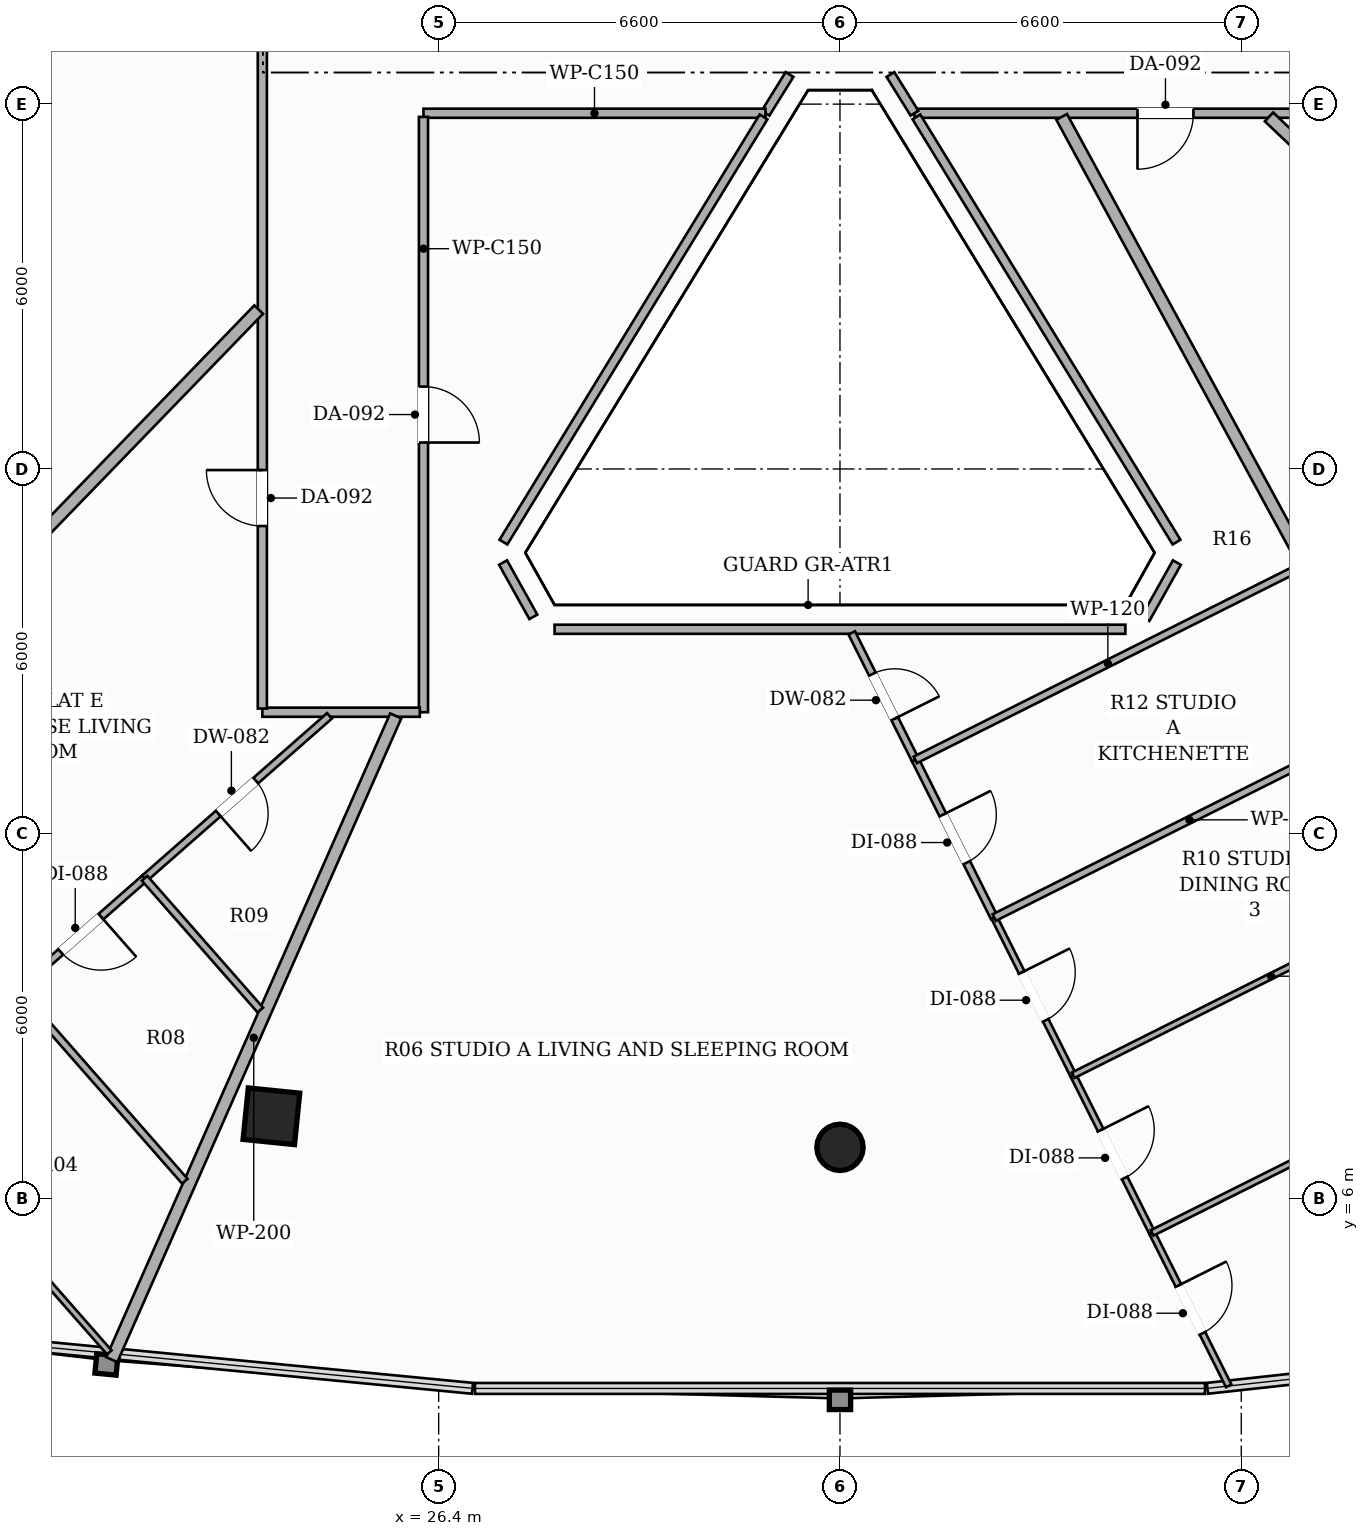
"""IFC4 building model, lengths in metres.
Left out: names, types, materials, properties, quantities, classifications, styles, units other than length and angle.
Written with IfcOpenShell. Run it as: python <this file> out.ifc"""

import sys

from ifc_helpers import new_model, si_unit, direction, frame, frame_2d, origin, origin_2d, place, context, subcontext, project, spatial, rectangle, hollow_rectangle, hollow_circle, extrude, element, fill, save


model = new_model("IFC4")
c1 = context("Model", 3, precision=1e-05, world=origin(), true_north=direction((0.0, 1.0)))
c2 = subcontext(c1, "Body", "Model", "MODEL_VIEW")
j1 = project(units=[si_unit("LENGTHUNIT", "METRE"), si_unit("PLANEANGLEUNIT", "RADIAN")], contexts=[c1])
p1 = place(None, origin())
s1 = spatial("IfcSite", under=j1, at=p1, CompositionType="ELEMENT")
p2 = place(p1, origin())
s2 = spatial("IfcBuilding", under=s1, at=p2, CompositionType="ELEMENT")
p3 = place(p2, frame((0.0, 0.0, 106.7)))
s3 = spatial("IfcBuildingStorey", under=s2, at=p3, CompositionType="ELEMENT", Elevation=106.7)
p4 = place(p3, frame((23.649, 7.355, 0.0), z_axis=(0.0, 0.0, 1.0), x_axis=(-0.994880708829, 0.101056297183, 0.0)))
e1 = element("IfcColumn", 1, at=p4, inside=s3, PredefinedType="COLUMN", context=c2, shape_type="SweptSolid", body=[
    extrude(hollow_rectangle(XDim=0.85, YDim=0.85, WallThickness=0.028, at=origin_2d()), origin(), (0.0, 0.0, 1.0), 3.3),
])
p5 = place(p3, frame((33.0, 6.844, 0.0), z_axis=(0.0, 0.0, 1.0), x_axis=(1.0, 0.0, 0.0)))
e2 = element("IfcColumn", 2, at=p5, inside=s3, PredefinedType="COLUMN", context=c2, shape_type="SweptSolid", body=[
    extrude(hollow_circle(Radius=0.381, WallThickness=0.022, at=origin_2d()), origin(), (0.0, 0.0, 1.0), 3.3),
])
p6 = place(p3, frame((20.095, 34.718, 0.0), z_axis=(0.0, 0.0, 1.0), x_axis=(-0.514362369366, -0.857572943242, 0.0)))
e3 = element("IfcWall", 3, at=p6, inside=s3, PredefinedType="SOLIDWALL", context=c2, shape_type="SweptSolid", body=[
    extrude(rectangle(XDim=11.844, YDim=0.24, at=frame_2d((5.922, 0.0))), origin(), (0.0, 0.0, 1.0), 2.624),
])
p7 = place(p6, frame((9.346, 0.0, 0.0)))
e4 = element("IfcOpeningElement", 4, at=p7, cuts=e3, PredefinedType="OPENING", context=c2, shape_type="SweptSolid", body=[
    extrude(rectangle(XDim=1.8, YDim=2.2, at=frame_2d((0.9, 1.1))), frame((0.0, 0.13, 0.0), z_axis=(0.0, -1.0, 0.0), x_axis=(1.0, 0.0, 0.0)), (0.0, 0.0, 1.0), 0.26),
])
p8 = place(p3, frame((32.17, 24.487, 0.0), z_axis=(0.0, 0.0, 1.0), x_axis=(-0.527038486816, -0.849841416627, 0.0)))
e5 = element("IfcWall", 5, at=p8, inside=s3, PredefinedType="PARTITIONING", context=c2, shape_type="SweptSolid", body=[
    extrude(rectangle(XDim=0.75, YDim=0.15, at=frame_2d((0.375, 0.0))), origin(), (0.0, 0.0, 1.0), 3.06),
])
p9 = place(p3, frame((31.775, 23.85, 0.0), z_axis=(0.0, 0.0, 1.0), x_axis=(-1.0, 0.0, 0.0)))
e6 = element("IfcWall", 6, at=p9, inside=s3, PredefinedType="PARTITIONING", context=c2, shape_type="SweptSolid", body=[
    extrude(rectangle(XDim=5.625, YDim=0.15, at=frame_2d((2.812, 0.0))), origin(), (0.0, 0.0, 1.0), 2.721),
])
p10 = place(p3, frame((26.15, 23.79, 0.0), z_axis=(0.0, 0.0, 1.0), x_axis=(0.0, -1.0, 0.0)))
e7 = element("IfcWall", 7, at=p10, inside=s3, PredefinedType="PARTITIONING", context=c2, shape_type="SweptSolid", body=[
    extrude(rectangle(XDim=9.79, YDim=0.15, at=frame_2d((4.895, 0.0))), origin(), (0.0, 0.0, 1.0), 2.721),
])
p11 = place(p10, frame((4.435, 0.0, 0.0)))
e8 = element("IfcOpeningElement", 8, at=p11, cuts=e7, PredefinedType="OPENING", context=c2, shape_type="SweptSolid", body=[
    extrude(rectangle(XDim=0.92, YDim=2.15, at=frame_2d((0.46, 1.075))), frame((0.0, 0.085, 0.0), z_axis=(0.0, -1.0, 0.0), x_axis=(1.0, 0.0, 0.0)), (0.0, 0.0, 1.0), 0.17),
])
p12 = place(p3, frame((26.09, 14.0, 0.0), z_axis=(0.0, 0.0, 1.0), x_axis=(-1.0, 0.0, 0.0)))
e9 = element("IfcWall", 9, at=p12, inside=s3, PredefinedType="PARTITIONING", context=c2, shape_type="SweptSolid", body=[
    extrude(rectangle(XDim=2.59, YDim=0.15, at=frame_2d((1.295, 0.0))), origin(), (0.0, 0.0, 1.0), 2.721),
])
p13 = place(p3, frame((23.5, 14.06, 0.0), z_axis=(0.0, 0.0, 1.0), x_axis=(0.0, 1.0, 0.0)))
e10 = element("IfcWall", 10, at=p13, inside=s3, PredefinedType="PARTITIONING", context=c2, shape_type="SweptSolid", body=[
    extrude(rectangle(XDim=22.84, YDim=0.15, at=frame_2d((11.42, 0.0))), origin(), (0.0, 0.0, 1.0), 2.413),
])
p14 = place(p13, frame((13.373, 0.0, 0.0)))
e11 = element("IfcOpeningElement", 11, at=p14, cuts=e10, PredefinedType="OPENING", context=c2, shape_type="SweptSolid", body=[
    extrude(rectangle(XDim=0.88, YDim=2.1, at=frame_2d((0.44, 1.05))), frame((0.0, 0.085, 0.0), z_axis=(0.0, -1.0, 0.0), x_axis=(1.0, 0.0, 0.0)), (0.0, 0.0, 1.0), 0.17),
])
p15 = place(p13, frame((3.002, 0.0, 0.0)))
e12 = element("IfcOpeningElement", 12, at=p15, cuts=e10, PredefinedType="OPENING", context=c2, shape_type="SweptSolid", body=[
    extrude(rectangle(XDim=0.92, YDim=2.15, at=frame_2d((0.46, 1.075))), frame((0.0, 0.085, 0.0), z_axis=(0.0, -1.0, 0.0), x_axis=(1.0, 0.0, 0.0)), (0.0, 0.0, 1.0), 0.17),
])
p16 = place(p3, frame((42.29, 23.85, 0.0), z_axis=(0.0, 0.0, 1.0), x_axis=(-1.0, 0.0, 0.0)))
e13 = element("IfcWall", 13, at=p16, inside=s3, PredefinedType="PARTITIONING", context=c2, shape_type="SweptSolid", body=[
    extrude(rectangle(XDim=8.065, YDim=0.15, at=frame_2d((4.032, 0.0))), origin(), (0.0, 0.0, 1.0), 2.492),
])
p17 = place(p16, frame((3.477, 0.0, 0.0)))
e14 = element("IfcOpeningElement", 14, at=p17, cuts=e13, PredefinedType="OPENING", context=c2, shape_type="SweptSolid", body=[
    extrude(rectangle(XDim=0.92, YDim=2.15, at=frame_2d((0.46, 1.075))), frame((0.0, 0.085, 0.0), z_axis=(0.0, -1.0, 0.0), x_axis=(1.0, 0.0, 0.0)), (0.0, 0.0, 1.0), 0.17),
])
p18 = place(p16, frame((0.14, 0.0, 0.0)))
e15 = element("IfcOpeningElement", 15, at=p18, cuts=e13, PredefinedType="OPENING", context=c2, shape_type="SweptSolid", body=[
    extrude(rectangle(XDim=0.88, YDim=2.1, at=frame_2d((0.44, 1.05))), frame((0.0, 0.085, 0.0), z_axis=(0.0, -1.0, 0.0), x_axis=(1.0, 0.0, 0.0)), (0.0, 0.0, 1.0), 0.17),
])
p19 = place(p3, frame((34.225, 23.851, 0.0), z_axis=(0.0, 0.0, 1.0), x_axis=(-0.527622593928, 0.849478898135, 0.0)))
e16 = element("IfcWall", 16, at=p19, inside=s3, PredefinedType="PARTITIONING", context=c2, shape_type="SweptSolid", body=[
    extrude(rectangle(XDim=0.749, YDim=0.15, at=frame_2d((0.375, 0.0))), origin(), (0.0, 0.0, 1.0), 3.06),
])
p20 = place(p3, frame((34.257, 23.79, 0.0), z_axis=(0.0, 0.0, 1.0), x_axis=(0.521839061235, -0.853043957935, 0.0)))
e17 = element("IfcWall", 17, at=p20, inside=s3, PredefinedType="PARTITIONING", context=c2, shape_type="SweptSolid", body=[
    extrude(rectangle(XDim=8.198, YDim=0.15, at=frame_2d((4.099, 0.0))), origin(), (0.0, 0.0, 1.0), 2.721),
])
p21 = place(p3, frame((38.541, 16.461, 0.0), z_axis=(0.0, 0.0, 1.0), x_axis=(-0.488631416095, -0.872490308946, 0.0)))
e18 = element("IfcWall", 18, at=p21, inside=s3, PredefinedType="PARTITIONING", context=c2, shape_type="SweptSolid", body=[
    extrude(rectangle(XDim=1.06, YDim=0.15, at=frame_2d((0.53, 0.0))), origin(), (0.0, 0.0, 1.0), 3.06),
])
p22 = place(p3, frame((37.694, 15.364, 0.0), z_axis=(0.0, 0.0, 1.0), x_axis=(-1.0, 0.0, 0.0)))
e19 = element("IfcWall", 19, at=p22, inside=s3, PredefinedType="PARTITIONING", context=c2, shape_type="SweptSolid", body=[
    extrude(rectangle(XDim=9.388, YDim=0.15, at=frame_2d((4.694, 0.0))), origin(), (0.0, 0.0, 1.0), 2.721),
])
p23 = place(p3, frame((27.957, 15.568, 0.0), z_axis=(0.0, 0.0, 1.0), x_axis=(-0.487162890713, 0.873311123204, 0.0)))
e20 = element("IfcWall", 20, at=p23, inside=s3, PredefinedType="PARTITIONING", context=c2, shape_type="SweptSolid", body=[
    extrude(rectangle(XDim=1.022, YDim=0.15, at=frame_2d((0.511, 0.0))), origin(), (0.0, 0.0, 1.0), 3.06),
])
p24 = place(p3, frame((27.465, 16.797, 0.0), z_axis=(0.0, 0.0, 1.0), x_axis=(0.521839061235, 0.853043957935, 0.0)))
e21 = element("IfcWall", 21, at=p24, inside=s3, PredefinedType="PARTITIONING", context=c2, shape_type="SweptSolid", body=[
    extrude(rectangle(XDim=8.198, YDim=0.15, at=frame_2d((4.099, 0.0))), origin(), (0.0, 0.0, 1.0), 2.721),
])
p25 = place(p3, frame((36.646, 23.79, 0.0), z_axis=(0.0, 0.0, 1.0), x_axis=(0.477391569207, -0.878690667784, 0.0)))
e22 = element("IfcWall", 22, at=p25, inside=s3, PredefinedType="PARTITIONING", context=c2, shape_type="SweptSolid", body=[
    extrude(rectangle(XDim=22.918, YDim=0.2, at=frame_2d((11.459, 0.0))), origin(), (0.0, 0.0, 1.0), 2.413),
])
p26 = place(p3, frame((21.024, 3.353, 0.0), z_axis=(0.0, 0.0, 1.0), x_axis=(0.403601766718, 0.914934759369, 0.0)))
e23 = element("IfcWall", 23, at=p26, inside=s3, PredefinedType="PARTITIONING", context=c2, shape_type="SweptSolid", body=[
    extrude(rectangle(XDim=11.571, YDim=0.2, at=frame_2d((5.786, 0.0))), origin(), (0.0, 0.0, 1.0), 2.413),
])
p27 = place(p3, frame((23.44, 20.621, 0.0), z_axis=(0.0, 0.0, 1.0), x_axis=(-0.695405261367, -0.718617786075, 0.0)))
e24 = element("IfcWall", 24, at=p27, inside=s3, PredefinedType="PARTITIONING", context=c2, shape_type="SweptSolid", body=[
    extrude(rectangle(XDim=21.635, YDim=0.2, at=frame_2d((10.817, 0.0))), origin(), (0.0, 0.0, 1.0), 2.413),
])
p28 = place(p3, frame((40.056, 23.79, 0.0), z_axis=(0.0, 0.0, 1.0), x_axis=(0.724633427165, -0.68913452695, 0.0)))
e25 = element("IfcWall", 25, at=p28, inside=s3, PredefinedType="PARTITIONING", context=c2, shape_type="SweptSolid", body=[
    extrude(rectangle(XDim=25.921, YDim=0.2, at=frame_2d((12.96, 0.0))), origin(), (0.0, 0.0, 1.0), 2.413),
])
p29 = place(p3, frame((33.194, 15.304, 0.0), z_axis=(0.0, 0.0, 1.0), x_axis=(0.447548179666, -0.894259820677, 0.0)))
e26 = element("IfcWall", 26, at=p29, inside=s3, PredefinedType="PARTITIONING", context=c2, shape_type="SweptSolid", body=[
    extrude(rectangle(XDim=2.335, YDim=0.12, at=frame_2d((1.167, 0.0))), origin(), (0.0, 0.0, 1.0), 2.721),
])
p30 = place(p29, frame((0.757, 0.0, 0.0)))
e27 = element("IfcOpeningElement", 27, at=p30, cuts=e26, PredefinedType="OPENING", context=c2, shape_type="SweptSolid", body=[
    extrude(rectangle(XDim=0.82, YDim=2.1, at=frame_2d((0.41, 1.05))), frame((0.0, 0.07, 0.0), z_axis=(0.0, -1.0, 0.0), x_axis=(1.0, 0.0, 0.0)), (0.0, 0.0, 1.0), 0.14),
])
p31 = place(p3, frame((34.239, 13.216, 0.0), z_axis=(0.0, 0.0, 1.0), x_axis=(0.447651342751, -0.894208183441, 0.0)))
e28 = element("IfcWall", 28, at=p31, inside=s3, PredefinedType="PARTITIONING", context=c2, shape_type="SweptSolid", body=[
    extrude(rectangle(XDim=2.9, YDim=0.12, at=frame_2d((1.45, 0.0))), origin(), (0.0, 0.0, 1.0), 3.06),
])
p32 = place(p31, frame((1.01, 0.0, 0.0)))
e29 = element("IfcOpeningElement", 29, at=p32, cuts=e28, PredefinedType="OPENING", context=c2, shape_type="SweptSolid", body=[
    extrude(rectangle(XDim=0.88, YDim=2.1, at=frame_2d((0.44, 1.05))), frame((0.0, 0.07, 0.0), z_axis=(0.0, -1.0, 0.0), x_axis=(1.0, 0.0, 0.0)), (0.0, 0.0, 1.0), 0.14),
])
p33 = place(p3, frame((38.134, 5.437, 0.0), z_axis=(0.0, 0.0, 1.0), x_axis=(0.447768773835, -0.894149386388, 0.0)))
e30 = element("IfcWall", 30, at=p33, inside=s3, PredefinedType="PARTITIONING", context=c2, shape_type="SweptSolid", body=[
    extrude(rectangle(XDim=2.814, YDim=0.1, at=frame_2d((1.407, 0.0))), origin(), (0.0, 0.0, 1.0), 3.06),
])
p34 = place(p33, frame((0.967, 0.0, 0.0)))
e31 = element("IfcOpeningElement", 31, at=p34, cuts=e30, PredefinedType="OPENING", context=c2, shape_type="SweptSolid", body=[
    extrude(rectangle(XDim=0.88, YDim=2.1, at=frame_2d((0.44, 1.05))), frame((0.0, 0.06, 0.0), z_axis=(0.0, -1.0, 0.0), x_axis=(1.0, 0.0, 0.0)), (0.0, 0.0, 1.0), 0.12),
])
p35 = place(p3, frame((36.836, 8.03, 0.0), z_axis=(0.0, 0.0, 1.0), x_axis=(0.447651342751, -0.894208183441, 0.0)))
e32 = element("IfcWall", 32, at=p35, inside=s3, PredefinedType="PARTITIONING", context=c2, shape_type="SweptSolid", body=[
    extrude(rectangle(XDim=2.9, YDim=0.1, at=frame_2d((1.45, 0.0))), origin(), (0.0, 0.0, 1.0), 2.413),
])
p36 = place(p35, frame((1.01, 0.0, 0.0)))
e33 = element("IfcOpeningElement", 33, at=p36, cuts=e32, PredefinedType="OPENING", context=c2, shape_type="SweptSolid", body=[
    extrude(rectangle(XDim=0.88, YDim=2.1, at=frame_2d((0.44, 1.05))), frame((0.0, 0.06, 0.0), z_axis=(0.0, -1.0, 0.0), x_axis=(1.0, 0.0, 0.0)), (0.0, 0.0, 1.0), 0.12),
])
p37 = place(p3, frame((35.537, 10.623, 0.0), z_axis=(0.0, 0.0, 1.0), x_axis=(0.447853271476, -0.894107066983, 0.0)))
e34 = element("IfcWall", 34, at=p37, inside=s3, PredefinedType="PARTITIONING", context=c2, shape_type="SweptSolid", body=[
    extrude(rectangle(XDim=2.9, YDim=0.1, at=frame_2d((1.45, 0.0))), origin(), (0.0, 0.0, 1.0), 3.06),
])
p38 = place(p37, frame((1.01, 0.0, 0.0)))
e35 = element("IfcOpeningElement", 35, at=p38, cuts=e34, PredefinedType="OPENING", context=c2, shape_type="SweptSolid", body=[
    extrude(rectangle(XDim=0.88, YDim=2.1, at=frame_2d((0.44, 1.05))), frame((0.0, 0.06, 0.0), z_axis=(0.0, -1.0, 0.0), x_axis=(1.0, 0.0, 0.0)), (0.0, 0.0, 1.0), 0.12),
])
p39 = place(p3, frame((40.572, 16.387, 0.0), z_axis=(0.0, 0.0, 1.0), x_axis=(-0.894178861749, -0.447709909653, 0.0)))
e36 = element("IfcWall", 36, at=p39, inside=s3, PredefinedType="PARTITIONING", context=c2, shape_type="SweptSolid", body=[
    extrude(rectangle(XDim=7.083, YDim=0.12, at=frame_2d((3.541, 0.0))), origin(), (0.0, 0.0, 1.0), 2.721),
])
p40 = place(p3, frame((41.957, 13.837, 0.0), z_axis=(0.0, 0.0, 1.0), x_axis=(-0.894209449688, -0.447648813344, 0.0)))
e37 = element("IfcWall", 37, at=p40, inside=s3, PredefinedType="PARTITIONING", context=c2, shape_type="SweptSolid", body=[
    extrude(rectangle(XDim=7.179, YDim=0.12, at=frame_2d((3.59, 0.0))), origin(), (0.0, 0.0, 1.0), 2.721),
])
p41 = place(p3, frame((38.134, 5.437, 0.0), z_axis=(0.0, 0.0, 1.0), x_axis=(0.894182030014, 0.447703581849, 0.0)))
e38 = element("IfcWall", 38, at=p41, inside=s3, PredefinedType="PARTITIONING", context=c2, shape_type="SweptSolid", body=[
    extrude(rectangle(XDim=7.373, YDim=0.1, at=frame_2d((3.687, 0.0))), origin(), (0.0, 0.0, 1.0), 2.413),
])
p42 = place(p3, frame((36.836, 8.03, 0.0), z_axis=(0.0, 0.0, 1.0), x_axis=(0.894205618721, 0.447656465884, 0.0)))
e39 = element("IfcWall", 39, at=p42, inside=s3, PredefinedType="PARTITIONING", context=c2, shape_type="SweptSolid", body=[
    extrude(rectangle(XDim=7.276, YDim=0.1, at=frame_2d((3.638, 0.0))), origin(), (0.0, 0.0, 1.0), 2.721),
])
p43 = place(p3, frame((24.604, 13.94, 0.0), z_axis=(0.0, 0.0, 1.0), x_axis=(-0.751349767919, -0.659904179595, 0.0)))
e40 = element("IfcWall", 40, at=p43, inside=s3, PredefinedType="PARTITIONING", context=c2, shape_type="SweptSolid", body=[
    extrude(rectangle(XDim=4.047, YDim=0.12, at=frame_2d((2.024, 0.0))), origin(), (0.0, 0.0, 1.0), 2.721),
])
p44 = place(p43, frame((1.614, 0.0, 0.0)))
e41 = element("IfcOpeningElement", 41, at=p44, cuts=e40, PredefinedType="OPENING", context=c2, shape_type="SweptSolid", body=[
    extrude(rectangle(XDim=0.82, YDim=2.1, at=frame_2d((0.41, 1.05))), frame((0.0, 0.07, 0.0), z_axis=(0.0, -1.0, 0.0), x_axis=(1.0, 0.0, 0.0)), (0.0, 0.0, 1.0), 0.14),
])
p45 = place(p3, frame((21.563, 11.269, 0.0), z_axis=(0.0, 0.0, 1.0), x_axis=(-0.751138604229, -0.660144527537, 0.0)))
e42 = element("IfcWall", 42, at=p45, inside=s3, PredefinedType="PARTITIONING", context=c2, shape_type="SweptSolid", body=[
    extrude(rectangle(XDim=2.79, YDim=0.12, at=frame_2d((1.395, 0.0))), origin(), (0.0, 0.0, 1.0), 2.721),
])
p46 = place(p45, frame((0.955, 0.0, 0.0)))
e43 = element("IfcOpeningElement", 43, at=p46, cuts=e42, PredefinedType="OPENING", context=c2, shape_type="SweptSolid", body=[
    extrude(rectangle(XDim=0.88, YDim=2.1, at=frame_2d((0.44, 1.05))), frame((0.0, 0.07, 0.0), z_axis=(0.0, -1.0, 0.0), x_axis=(1.0, 0.0, 0.0)), (0.0, 0.0, 1.0), 0.14),
])
p47 = place(p3, frame((23.467, 9.102, 0.0), z_axis=(0.0, 0.0, 1.0), x_axis=(-0.660061062947, 0.751211949573, 0.0)))
e44 = element("IfcWall", 44, at=p47, inside=s3, PredefinedType="PARTITIONING", context=c2, shape_type="SweptSolid", body=[
    extrude(rectangle(XDim=2.885, YDim=0.12, at=frame_2d((1.442, 0.0))), origin(), (0.0, 0.0, 1.0), 2.721),
])
p48 = place(p3, frame((22.225, 6.287, 0.0), z_axis=(0.0, 0.0, 1.0), x_axis=(-0.659946783628, 0.751312347016, 0.0)))
e45 = element("IfcWall", 45, at=p48, inside=s3, PredefinedType="PARTITIONING", context=c2, shape_type="SweptSolid", body=[
    extrude(rectangle(XDim=4.179, YDim=0.12, at=frame_2d((2.09, 0.0))), origin(), (0.0, 0.0, 1.0), 2.413),
])
p49 = place(p3, frame((17.37, 7.586, 0.0), z_axis=(0.0, 0.0, 1.0), x_axis=(0.659851528992, -0.751396007234, 0.0)))
e46 = element("IfcWall", 46, at=p49, inside=s3, PredefinedType="PARTITIONING", context=c2, shape_type="SweptSolid", body=[
    extrude(rectangle(XDim=5.475, YDim=0.1, at=frame_2d((2.738, 0.0))), origin(), (0.0, 0.0, 1.0), 2.413),
])
p50 = place(p11, origin())
e47 = element("IfcDoor", 47, at=p50, inside=s3, OperationType="SINGLE_SWING_RIGHT", PredefinedType="DOOR", context=c2, shape_type="SweptSolid", body=[
    extrude(rectangle(XDim=0.92, YDim=2.15, at=frame_2d((0.46, 1.075))), frame((0.0, 0.025, 0.0), z_axis=(0.0, -1.0, 0.0), x_axis=(1.0, 0.0, 0.0)), (0.0, 0.0, 1.0), 0.05),
])
fill(e8, e47)
p51 = place(p30, origin())
e48 = element("IfcDoor", 48, at=p51, inside=s3, OperationType="SINGLE_SWING_RIGHT", PredefinedType="DOOR", context=c2, shape_type="SweptSolid", body=[
    extrude(rectangle(XDim=0.82, YDim=2.1, at=frame_2d((0.41, 1.05))), frame((0.0, 0.025, 0.0), z_axis=(0.0, -1.0, 0.0), x_axis=(1.0, 0.0, 0.0)), (0.0, 0.0, 1.0), 0.05),
])
fill(e27, e48)
p52 = place(p32, origin())
e49 = element("IfcDoor", 49, at=p52, inside=s3, OperationType="SINGLE_SWING_LEFT", PredefinedType="DOOR", context=c2, shape_type="SweptSolid", body=[
    extrude(rectangle(XDim=0.88, YDim=2.1, at=frame_2d((0.44, 1.05))), frame((0.0, 0.025, 0.0), z_axis=(0.0, -1.0, 0.0), x_axis=(1.0, 0.0, 0.0)), (0.0, 0.0, 1.0), 0.05),
])
fill(e29, e49)
p53 = place(p34, origin())
e50 = element("IfcDoor", 50, at=p53, inside=s3, OperationType="SINGLE_SWING_LEFT", PredefinedType="DOOR", context=c2, shape_type="SweptSolid", body=[
    extrude(rectangle(XDim=0.88, YDim=2.1, at=frame_2d((0.44, 1.05))), frame((0.0, 0.025, 0.0), z_axis=(0.0, -1.0, 0.0), x_axis=(1.0, 0.0, 0.0)), (0.0, 0.0, 1.0), 0.05),
])
fill(e31, e50)
p54 = place(p36, origin())
e51 = element("IfcDoor", 51, at=p54, inside=s3, OperationType="SINGLE_SWING_LEFT", PredefinedType="DOOR", context=c2, shape_type="SweptSolid", body=[
    extrude(rectangle(XDim=0.88, YDim=2.1, at=frame_2d((0.44, 1.05))), frame((0.0, 0.025, 0.0), z_axis=(0.0, -1.0, 0.0), x_axis=(1.0, 0.0, 0.0)), (0.0, 0.0, 1.0), 0.05),
])
fill(e33, e51)
p55 = place(p38, origin())
e52 = element("IfcDoor", 52, at=p55, inside=s3, OperationType="SINGLE_SWING_LEFT", PredefinedType="DOOR", context=c2, shape_type="SweptSolid", body=[
    extrude(rectangle(XDim=0.88, YDim=2.1, at=frame_2d((0.44, 1.05))), frame((0.0, 0.025, 0.0), z_axis=(0.0, -1.0, 0.0), x_axis=(1.0, 0.0, 0.0)), (0.0, 0.0, 1.0), 0.05),
])
fill(e35, e52)
p56 = place(p17, origin())
e53 = element("IfcDoor", 53, at=p56, inside=s3, OperationType="SINGLE_SWING_RIGHT", PredefinedType="DOOR", context=c2, shape_type="SweptSolid", body=[
    extrude(rectangle(XDim=0.92, YDim=2.15, at=frame_2d((0.46, 1.075))), frame((0.0, 0.025, 0.0), z_axis=(0.0, -1.0, 0.0), x_axis=(1.0, 0.0, 0.0)), (0.0, 0.0, 1.0), 0.05),
])
fill(e14, e53)
p57 = place(p15, origin())
e54 = element("IfcDoor", 54, at=p57, inside=s3, OperationType="SINGLE_SWING_RIGHT", PredefinedType="DOOR", context=c2, shape_type="SweptSolid", body=[
    extrude(rectangle(XDim=0.92, YDim=2.15, at=frame_2d((0.46, 1.075))), frame((0.0, 0.025, 0.0), z_axis=(0.0, -1.0, 0.0), x_axis=(1.0, 0.0, 0.0)), (0.0, 0.0, 1.0), 0.05),
])
fill(e12, e54)
p58 = place(p44, origin())
e55 = element("IfcDoor", 55, at=p58, inside=s3, OperationType="SINGLE_SWING_RIGHT", PredefinedType="DOOR", context=c2, shape_type="SweptSolid", body=[
    extrude(rectangle(XDim=0.82, YDim=2.1, at=frame_2d((0.41, 1.05))), frame((0.0, 0.025, 0.0), z_axis=(0.0, -1.0, 0.0), x_axis=(1.0, 0.0, 0.0)), (0.0, 0.0, 1.0), 0.05),
])
fill(e41, e55)
p59 = place(p46, origin())
e56 = element("IfcDoor", 56, at=p59, inside=s3, OperationType="SINGLE_SWING_LEFT", PredefinedType="DOOR", context=c2, shape_type="SweptSolid", body=[
    extrude(rectangle(XDim=0.88, YDim=2.1, at=frame_2d((0.44, 1.05))), frame((0.0, 0.025, 0.0), z_axis=(0.0, -1.0, 0.0), x_axis=(1.0, 0.0, 0.0)), (0.0, 0.0, 1.0), 0.05),
])
fill(e43, e56)
save(model, sys.argv[1])
